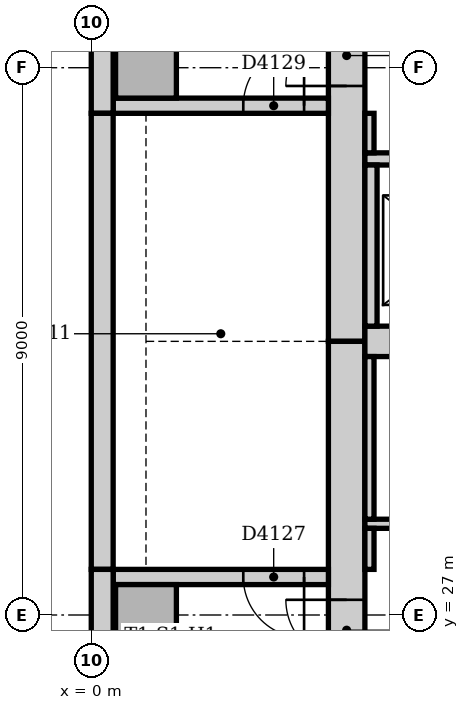
"""IFC4 building model, lengths in metres.
Left out: names, types, materials, properties, quantities, classifications, styles, units other than length and angle.
Written with IfcOpenShell. Run it as: python <this file> out.ifc"""

import sys

from ifc_helpers import new_model, si_unit, direction, frame, frame_2d, origin, origin_2d, place, context, subcontext, project, spatial, rectangle, extrude, element, fill, save


model = new_model("IFC4")
c1 = context("Model", 3, precision=1e-05, world=origin(), true_north=direction((0.0, 1.0)))
c2 = subcontext(c1, "Body", "Model", "MODEL_VIEW")
j1 = project(units=[si_unit("LENGTHUNIT", "METRE"), si_unit("PLANEANGLEUNIT", "RADIAN")], contexts=[c1])
p1 = place(None, origin())
s1 = spatial("IfcSite", under=j1, at=p1, CompositionType="ELEMENT")
p2 = place(p1, origin())
s2 = spatial("IfcBuilding", under=s1, at=p2, CompositionType="ELEMENT")
p3 = place(p2, frame((0.0, 0.0, 120.0)))
s3 = spatial("IfcBuildingStorey", under=s2, at=p3, CompositionType="ELEMENT", Elevation=120.0)
p4 = place(p3, frame((4.2, 42.0, 0.0), z_axis=(0.0, 0.0, 1.0), x_axis=(0.0, -1.0, 0.0)))
e1 = element("IfcWall", 1, at=p4, inside=s3, PredefinedType="SOLIDWALL", context=c2, shape_type="SweptSolid", body=[
    extrude(rectangle(XDim=10.5, YDim=0.6, at=frame_2d((5.25, 0.0))), origin(), (0.0, 0.0, 1.0), 4.0),
])
p5 = place(p4, frame((5.3, 0.0, 0.0)))
e2 = element("IfcOpeningElement", 2, at=p5, cuts=e1, PredefinedType="OPENING", context=c2, shape_type="SweptSolid", body=[
    extrude(rectangle(XDim=1.0, YDim=2.1, at=frame_2d((0.5, 1.05))), frame((0.0, 0.31, 0.0), z_axis=(0.0, -1.0, 0.0), x_axis=(1.0, 0.0, 0.0)), (0.0, 0.0, 1.0), 0.62),
])
p6 = place(p3, frame((4.2, 31.5, 0.0), z_axis=(0.0, 0.0, 1.0), x_axis=(0.0, -1.0, 0.0)))
e3 = element("IfcWall", 3, at=p6, inside=s3, PredefinedType="SOLIDWALL", context=c2, shape_type="SweptSolid", body=[
    extrude(rectangle(XDim=10.5, YDim=0.6, at=frame_2d((5.25, 0.0))), origin(), (0.0, 0.0, 1.0), 4.0),
])
p7 = place(p6, frame((4.25, 0.0, 0.0)))
e4 = element("IfcOpeningElement", 4, at=p7, cuts=e3, PredefinedType="OPENING", context=c2, shape_type="SweptSolid", body=[
    extrude(rectangle(XDim=1.0, YDim=2.1, at=frame_2d((0.5, 1.05))), frame((0.0, 0.31, 0.0), z_axis=(0.0, -1.0, 0.0), x_axis=(1.0, 0.0, 0.0)), (0.0, 0.0, 1.0), 0.62),
])
p8 = place(p3, frame((4.5, 31.5, 0.0), z_axis=(0.0, 0.0, 1.0), x_axis=(1.0, 0.0, 0.0)))
e5 = element("IfcWall", 5, at=p8, inside=s3, PredefinedType="SOLIDWALL", context=c2, shape_type="SweptSolid", body=[
    extrude(rectangle(XDim=18.0, YDim=0.5, at=frame_2d((9.0, 0.0))), origin(), (0.0, 0.0, 1.0), 4.0),
])
p9 = place(p3, frame((3.9, 27.625, 0.0), z_axis=(0.0, 0.0, 1.0), x_axis=(-1.0, 0.0, 0.0)))
e6 = element("IfcWall", 6, at=p9, inside=s3, PredefinedType="SOLIDWALL", context=c2, shape_type="SweptSolid", body=[
    extrude(rectangle(XDim=3.54, YDim=0.25, at=frame_2d((1.77, 0.0))), origin(), (0.0, 0.0, 1.0), 4.0),
])
p10 = place(p9, frame((0.4, 0.0, 0.0)))
e7 = element("IfcOpeningElement", 7, at=p10, cuts=e6, PredefinedType="OPENING", context=c2, shape_type="SweptSolid", body=[
    extrude(rectangle(XDim=1.0, YDim=2.1, at=frame_2d((0.5, 1.05))), frame((0.0, 0.135, 0.0), z_axis=(0.0, -1.0, 0.0), x_axis=(1.0, 0.0, 0.0)), (0.0, 0.0, 1.0), 0.27),
])
p11 = place(p3, frame((0.36, 35.375, 0.0), z_axis=(0.0, 0.0, 1.0), x_axis=(1.0, 0.0, 0.0)))
e8 = element("IfcWall", 8, at=p11, inside=s3, PredefinedType="SOLIDWALL", context=c2, shape_type="SweptSolid", body=[
    extrude(rectangle(XDim=3.54, YDim=0.25, at=frame_2d((1.77, 0.0))), origin(), (0.0, 0.0, 1.0), 4.0),
])
p12 = place(p11, frame((2.14, 0.0, 0.0)))
e9 = element("IfcOpeningElement", 9, at=p12, cuts=e8, PredefinedType="OPENING", context=c2, shape_type="SweptSolid", body=[
    extrude(rectangle(XDim=1.0, YDim=2.1, at=frame_2d((0.5, 1.05))), frame((0.0, 0.135, 0.0), z_axis=(0.0, -1.0, 0.0), x_axis=(1.0, 0.0, 0.0)), (0.0, 0.0, 1.0), 0.27),
])
for number, where, z_axis, x_axis in (
    (10, (0.9, 27.0, 0.0), (0.0, 0.0, 1.0), (1.0, 0.0, 0.0)),
    (11, (0.9, 36.0, 0.0), (0.0, 0.0, 1.0), (1.0, 0.0, 0.0)),
):
    element("IfcColumn", number, at=place(p3, frame(where, z_axis=z_axis, x_axis=x_axis)), inside=s3, PredefinedType="COLUMN", context=c2, shape_type="SweptSolid", body=[
        extrude(rectangle(XDim=1.0, YDim=1.0, at=origin_2d()), origin(), (0.0, 0.0, 1.0), 4.0),
    ])
p13 = place(p3, frame((0.18, 42.0, 0.0), z_axis=(0.0, 0.0, 1.0), x_axis=(0.0, -1.0, 0.0)))
e12 = element("IfcWall", 12, at=p13, inside=s3, PredefinedType="STANDARD", context=c2, shape_type="SweptSolid", body=[
    extrude(rectangle(XDim=6.75, YDim=0.36, at=frame_2d((3.375, 0.0))), origin(), (0.0, 0.0, 1.0), 3.85),
])
p14 = place(p3, frame((0.18, 35.25, 0.0), z_axis=(0.0, 0.0, 1.0), x_axis=(0.0, -1.0, 0.0)))
e13 = element("IfcWall", 13, at=p14, inside=s3, PredefinedType="STANDARD", context=c2, shape_type="SweptSolid", body=[
    extrude(rectangle(XDim=7.5, YDim=0.36, at=frame_2d((3.75, 0.0))), origin(), (0.0, 0.0, 1.0), 3.85),
])
p15 = place(p3, frame((0.18, 27.75, 0.0), z_axis=(0.0, 0.0, 1.0), x_axis=(0.0, -1.0, 0.0)))
e14 = element("IfcWall", 14, at=p15, inside=s3, PredefinedType="STANDARD", context=c2, shape_type="SweptSolid", body=[
    extrude(rectangle(XDim=6.75, YDim=0.36, at=frame_2d((3.375, 0.0))), origin(), (0.0, 0.0, 1.0), 3.85),
])
p16 = place(p3, frame((4.5, 34.5, 0.0), z_axis=(0.0, 0.0, 1.0), x_axis=(1.0, 0.0, 0.0)))
e15 = element("IfcWall", 15, at=p16, inside=s3, PredefinedType="PARTITIONING", context=c2, shape_type="SweptSolid", body=[
    extrude(rectangle(XDim=18.0, YDim=0.2, at=frame_2d((9.0, 0.0))), origin(), (0.0, 0.0, 1.0), 3.85),
])
p17 = place(p16, frame((0.95, 0.0, 0.0)))
e16 = element("IfcOpeningElement", 16, at=p17, cuts=e15, PredefinedType="OPENING", context=c2, shape_type="SweptSolid", body=[
    extrude(rectangle(XDim=1.1, YDim=2.1, at=frame_2d((0.55, 1.05))), frame((0.0, 0.11, 0.0), z_axis=(0.0, -1.0, 0.0), x_axis=(1.0, 0.0, 0.0)), (0.0, 0.0, 1.0), 0.22),
])
p18 = place(p16, frame((3.95, 0.0, 0.0)))
e17 = element("IfcOpeningElement", 17, at=p18, cuts=e15, PredefinedType="OPENING", context=c2, shape_type="SweptSolid", body=[
    extrude(rectangle(XDim=1.1, YDim=2.1, at=frame_2d((0.55, 1.05))), frame((0.0, 0.11, 0.0), z_axis=(0.0, -1.0, 0.0), x_axis=(1.0, 0.0, 0.0)), (0.0, 0.0, 1.0), 0.22),
])
p19 = place(p16, frame((12.95, 0.0, 0.0)))
e18 = element("IfcOpeningElement", 18, at=p19, cuts=e15, PredefinedType="OPENING", context=c2, shape_type="SweptSolid", body=[
    extrude(rectangle(XDim=1.1, YDim=2.1, at=frame_2d((0.55, 1.05))), frame((0.0, 0.11, 0.0), z_axis=(0.0, -1.0, 0.0), x_axis=(1.0, 0.0, 0.0)), (0.0, 0.0, 1.0), 0.22),
])
p20 = place(p16, frame((15.95, 0.0, 0.0)))
e19 = element("IfcOpeningElement", 19, at=p20, cuts=e15, PredefinedType="OPENING", context=c2, shape_type="SweptSolid", body=[
    extrude(rectangle(XDim=1.1, YDim=2.1, at=frame_2d((0.55, 1.05))), frame((0.0, 0.11, 0.0), z_axis=(0.0, -1.0, 0.0), x_axis=(1.0, 0.0, 0.0)), (0.0, 0.0, 1.0), 0.22),
])
p21 = place(p3, frame((4.6, 31.75, 0.0), z_axis=(0.0, 0.0, 1.0), x_axis=(0.0, 1.0, 0.0)))
e20 = element("IfcWall", 20, at=p21, inside=s3, PredefinedType="PARTITIONING", context=c2, shape_type="SweptSolid", body=[
    extrude(rectangle(XDim=2.65, YDim=0.2, at=frame_2d((1.325, 0.0))), origin(), (0.0, 0.0, 1.0), 3.85),
])
p22 = place(p3, frame((4.5, 28.5, 0.0), z_axis=(0.0, 0.0, 1.0), x_axis=(1.0, 0.0, 0.0)))
e21 = element("IfcWall", 21, at=p22, inside=s3, PredefinedType="PARTITIONING", context=c2, shape_type="SweptSolid", body=[
    extrude(rectangle(XDim=18.0, YDim=0.15, at=frame_2d((9.0, 0.0))), origin(), (0.0, 0.0, 1.0), 3.85),
])
p23 = place(p22, frame((1.1, 0.0, 0.0)))
e22 = element("IfcOpeningElement", 22, at=p23, cuts=e21, PredefinedType="OPENING", context=c2, shape_type="SweptSolid", body=[
    extrude(rectangle(XDim=0.9, YDim=2.1, at=frame_2d((0.45, 1.05))), frame((0.0, 0.085, 0.0), z_axis=(0.0, -1.0, 0.0), x_axis=(1.0, 0.0, 0.0)), (0.0, 0.0, 1.0), 0.17),
])
p24 = place(p22, frame((5.55, 0.0, 0.0)))
e23 = element("IfcOpeningElement", 23, at=p24, cuts=e21, PredefinedType="OPENING", context=c2, shape_type="SweptSolid", body=[
    extrude(rectangle(XDim=0.9, YDim=2.1, at=frame_2d((0.45, 1.05))), frame((0.0, 0.085, 0.0), z_axis=(0.0, -1.0, 0.0), x_axis=(1.0, 0.0, 0.0)), (0.0, 0.0, 1.0), 0.17),
])
p25 = place(p22, frame((12.95, 0.0, 0.0)))
e24 = element("IfcOpeningElement", 24, at=p25, cuts=e21, PredefinedType="OPENING", context=c2, shape_type="SweptSolid", body=[
    extrude(rectangle(XDim=0.9, YDim=2.1, at=frame_2d((0.45, 1.05))), frame((0.0, 0.085, 0.0), z_axis=(0.0, -1.0, 0.0), x_axis=(1.0, 0.0, 0.0)), (0.0, 0.0, 1.0), 0.17),
])
p26 = place(p3, frame((4.575, 27.75, 0.0), z_axis=(0.0, 0.0, 1.0), x_axis=(0.0, 1.0, 0.0)))
e25 = element("IfcWall", 25, at=p26, inside=s3, PredefinedType="PARTITIONING", context=c2, shape_type="SweptSolid", body=[
    extrude(rectangle(XDim=0.675, YDim=0.15, at=frame_2d((0.338, 0.0))), origin(), (0.0, 0.0, 1.0), 3.85),
])
p27 = place(p3, frame((4.575, 28.575, 0.0), z_axis=(0.0, 0.0, 1.0), x_axis=(0.0, 1.0, 0.0)))
e26 = element("IfcWall", 26, at=p27, inside=s3, PredefinedType="PARTITIONING", context=c2, shape_type="SweptSolid", body=[
    extrude(rectangle(XDim=2.675, YDim=0.15, at=frame_2d((1.337, 0.0))), origin(), (0.0, 0.0, 1.0), 3.85),
])
p28 = place(p3, frame((4.575, 34.6, 0.0), z_axis=(0.0, 0.0, 1.0), x_axis=(0.0, 1.0, 0.0)))
e27 = element("IfcWall", 27, at=p28, inside=s3, PredefinedType="PARTITIONING", context=c2, shape_type="SweptSolid", body=[
    extrude(rectangle(XDim=0.65, YDim=0.15, at=frame_2d((0.325, 0.0))), origin(), (0.0, 0.0, 1.0), 3.85),
])
p29 = place(p7, frame((1.0, 0.0, 0.0), z_axis=(0.0, 0.0, 1.0), x_axis=(-1.0, 0.0, 0.0)))
e28 = element("IfcDoor", 28, at=p29, inside=s3, OperationType="SINGLE_SWING_RIGHT", PredefinedType="DOOR", context=c2, shape_type="SweptSolid", body=[
    extrude(rectangle(XDim=1.0, YDim=2.1, at=frame_2d((0.5, 1.05))), frame((0.0, 0.025, 0.0), z_axis=(0.0, -1.0, 0.0), x_axis=(1.0, 0.0, 0.0)), (0.0, 0.0, 1.0), 0.05),
])
fill(e4, e28)
p30 = place(p10, origin())
e29 = element("IfcDoor", 29, at=p30, inside=s3, OperationType="SINGLE_SWING_LEFT", PredefinedType="DOOR", context=c2, shape_type="SweptSolid", body=[
    extrude(rectangle(XDim=1.0, YDim=2.1, at=frame_2d((0.5, 1.05))), frame((0.0, 0.025, 0.0), z_axis=(0.0, -1.0, 0.0), x_axis=(1.0, 0.0, 0.0)), (0.0, 0.0, 1.0), 0.05),
])
fill(e7, e29)
p31 = place(p5, frame((1.0, 0.0, 0.0), z_axis=(0.0, 0.0, 1.0), x_axis=(-1.0, 0.0, 0.0)))
e30 = element("IfcDoor", 30, at=p31, inside=s3, OperationType="SINGLE_SWING_LEFT", PredefinedType="DOOR", context=c2, shape_type="SweptSolid", body=[
    extrude(rectangle(XDim=1.0, YDim=2.1, at=frame_2d((0.5, 1.05))), frame((0.0, 0.025, 0.0), z_axis=(0.0, -1.0, 0.0), x_axis=(1.0, 0.0, 0.0)), (0.0, 0.0, 1.0), 0.05),
])
fill(e2, e30)
p32 = place(p12, origin())
e31 = element("IfcDoor", 31, at=p32, inside=s3, OperationType="SINGLE_SWING_RIGHT", PredefinedType="DOOR", context=c2, shape_type="SweptSolid", body=[
    extrude(rectangle(XDim=1.0, YDim=2.1, at=frame_2d((0.5, 1.05))), frame((0.0, 0.025, 0.0), z_axis=(0.0, -1.0, 0.0), x_axis=(1.0, 0.0, 0.0)), (0.0, 0.0, 1.0), 0.05),
])
fill(e9, e31)
save(model, sys.argv[1])
